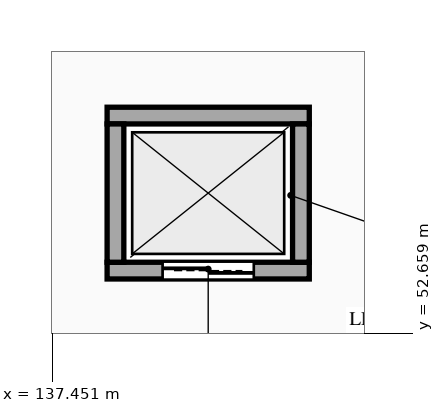
"""IFC4 building model, lengths in metres.
Left out: names, types, materials, properties, quantities, classifications, styles, units other than length and angle.
Written with IfcOpenShell. Run it as: python <this file> out.ifc"""

import sys

from ifc_helpers import new_model, si_unit, direction, frame, frame_2d, origin, place, context, subcontext, project, spatial, rectangle, extrude, element, fill, save


model = new_model("IFC4")
c1 = context("Model", 3, precision=1e-05, world=origin(), true_north=direction((0.0, 1.0)))
c2 = subcontext(c1, "Body", "Model", "MODEL_VIEW")
j1 = project(units=[si_unit("LENGTHUNIT", "METRE"), si_unit("PLANEANGLEUNIT", "RADIAN")], contexts=[c1])
p1 = place(None, origin())
s1 = spatial("IfcSite", under=j1, at=p1, CompositionType="ELEMENT")
p2 = place(p1, origin())
s2 = spatial("IfcBuilding", under=s1, at=p2, CompositionType="ELEMENT")
p3 = place(p2, frame((0.0, 0.0, 15.3)))
s3 = spatial("IfcBuildingStorey", under=s2, at=p3, CompositionType="ELEMENT", Elevation=15.3)
p4 = place(p3, frame((138.17, 53.48, 0.0), z_axis=(0.0, 0.0, 1.0), x_axis=(1.0, 0.0, 0.0)))
e1 = element("IfcWall", 1, at=p4, inside=s3, PredefinedType="STANDARD", context=c2, shape_type="SweptSolid", body=[
    extrude(rectangle(XDim=2.66, YDim=0.22, at=frame_2d((1.33, 0.0))), origin(), (0.0, 0.0, 1.0), 4.25),
])
p5 = place(p4, frame((0.73, 0.0, 0.0)))
e2 = element("IfcOpeningElement", 2, at=p5, cuts=e1, PredefinedType="OPENING", context=c2, shape_type="SweptSolid", body=[
    extrude(rectangle(XDim=1.2, YDim=2.2, at=frame_2d((0.6, 1.1))), frame((0.0, 0.12, 0.0), z_axis=(0.0, -1.0, 0.0), x_axis=(1.0, 0.0, 0.0)), (0.0, 0.0, 1.0), 0.24),
])
p6 = place(p3, frame((140.83, 55.52, 0.0), z_axis=(0.0, 0.0, 1.0), x_axis=(-1.0, 0.0, 0.0)))
e3 = element("IfcWall", 3, at=p6, inside=s3, PredefinedType="STANDARD", context=c2, shape_type="SweptSolid", body=[
    extrude(rectangle(XDim=2.66, YDim=0.22, at=frame_2d((1.33, 0.0))), origin(), (0.0, 0.0, 1.0), 4.25),
])
for number, where, z_axis, x_axis in (
    (4, (138.28, 55.41, 0.0), (0.0, 0.0, 1.0), (0.0, -1.0, 0.0)),
    (5, (140.72, 53.59, 0.0), (0.0, 0.0, 1.0), (0.0, 1.0, 0.0)),
):
    element("IfcWall", number, at=place(p3, frame(where, z_axis=z_axis, x_axis=x_axis)), inside=s3, PredefinedType="STANDARD", context=c2, shape_type="SweptSolid", body=[
        extrude(rectangle(XDim=1.82, YDim=0.22, at=frame_2d((0.91, 0.0))), origin(), (0.0, 0.0, 1.0), 4.25),
    ])
p7 = place(p5, origin())
e6 = element("IfcDoor", 6, at=p7, inside=s3, OperationType="DOUBLE_DOOR_SLIDING", PredefinedType="DOOR", context=c2, shape_type="SweptSolid", body=[
    extrude(rectangle(XDim=1.2, YDim=2.2, at=frame_2d((0.6, 1.1))), frame((0.0, 0.025, 0.0), z_axis=(0.0, -1.0, 0.0), x_axis=(1.0, 0.0, 0.0)), (0.0, 0.0, 1.0), 0.05),
])
fill(e2, e6)
save(model, sys.argv[1])
